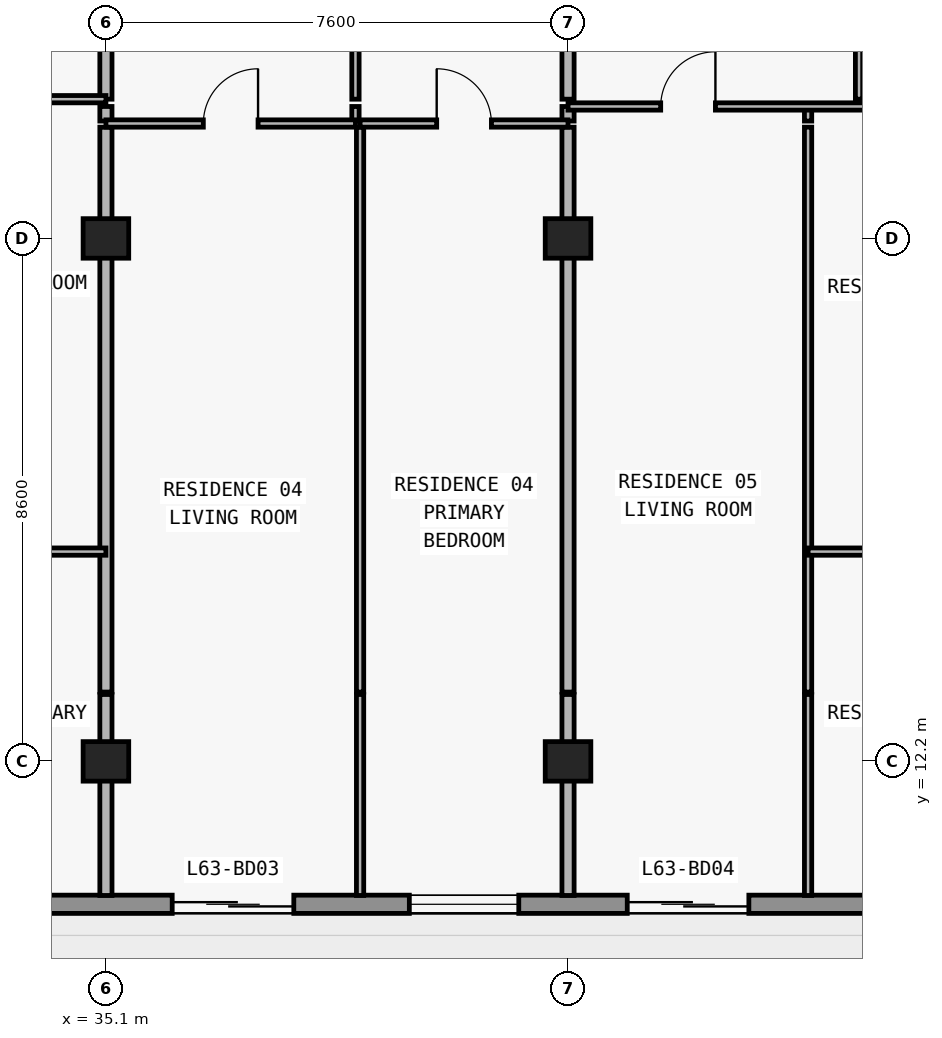
"""IFC4 building model, lengths in metres.
Left out: names, types, materials, properties, quantities, classifications, styles, units other than length and angle.
Written with IfcOpenShell. Run it as: python <this file> out.ifc"""

import sys

from ifc_helpers import new_model, si_unit, direction, frame, frame_2d, origin, origin_2d, place, context, subcontext, project, spatial, rectangle, extrude, element, fill, save


model = new_model("IFC4")
c1 = context("Model", 3, precision=1e-05, world=origin(), true_north=direction((0.0, 1.0)))
c2 = subcontext(c1, "Body", "Model", "MODEL_VIEW")
j1 = project(units=[si_unit("LENGTHUNIT", "METRE"), si_unit("PLANEANGLEUNIT", "RADIAN")], contexts=[c1])
p1 = place(None, origin())
s1 = spatial("IfcSite", under=j1, at=p1, CompositionType="ELEMENT")
p2 = place(p1, origin())
s2 = spatial("IfcBuilding", under=s1, at=p2, CompositionType="ELEMENT")
p3 = place(p2, frame((0.0, 0.0, 226.5)))
s3 = spatial("IfcBuildingStorey", under=s2, at=p3, CompositionType="ELEMENT", Elevation=226.5)
for number, where, z_axis, x_axis in (
    (1, (35.1, 12.2, 0.0), (0.0, 0.0, 1.0), (1.0, 0.0, 0.0)),
    (2, (42.7, 12.2, 0.0), (0.0, 0.0, 1.0), (1.0, 0.0, 0.0)),
    (3, (35.1, 20.8, 0.0), (0.0, 0.0, 1.0), (1.0, 0.0, 0.0)),
    (4, (42.7, 20.8, 0.0), (0.0, 0.0, 1.0), (1.0, 0.0, 0.0)),
):
    element("IfcColumn", number, at=place(p3, frame(where, z_axis=z_axis, x_axis=x_axis)), inside=s3, PredefinedType="COLUMN", context=c2, shape_type="SweptSolid", body=[
        extrude(rectangle(XDim=0.75, YDim=0.65, at=origin_2d()), origin(), (0.0, 0.0, 1.0), 3.05),
    ])
p4 = place(p3, frame((65.7, 9.85, 0.0), z_axis=(0.0, 0.0, 1.0), x_axis=(-1.0, 0.0, 0.0)))
e5 = element("IfcWall", 5, at=p4, inside=s3, PredefinedType="STANDARD", context=c2, shape_type="SweptSolid", body=[
    extrude(rectangle(XDim=53.6, YDim=0.3, at=frame_2d((26.8, 0.0))), origin(), (0.0, 0.0, 1.0), 3.05),
])
p5 = place(p4, frame((48.05, 0.0, 0.85)))
e6 = element("IfcOpeningElement", 6, at=p5, cuts=e5, PredefinedType="OPENING", context=c2, shape_type="SweptSolid", body=[
    extrude(rectangle(XDim=1.8, YDim=1.55, at=frame_2d((0.9, 0.775))), frame((0.0, 0.16, 0.0), z_axis=(0.0, -1.0, 0.0), x_axis=(1.0, 0.0, 0.0)), (0.0, 0.0, 1.0), 0.32),
])
p6 = place(p4, frame((44.09, 0.0, 0.0)))
e7 = element("IfcOpeningElement", 7, at=p6, cuts=e5, PredefinedType="OPENING", context=c2, shape_type="SweptSolid", body=[
    extrude(rectangle(XDim=2.0, YDim=2.3, at=frame_2d((1.0, 1.15))), frame((0.0, 0.16, 0.0), z_axis=(0.0, -1.0, 0.0), x_axis=(1.0, 0.0, 0.0)), (0.0, 0.0, 1.0), 0.32),
])
p7 = place(p4, frame((39.99, 0.0, 0.85)))
e8 = element("IfcOpeningElement", 8, at=p7, cuts=e5, PredefinedType="OPENING", context=c2, shape_type="SweptSolid", body=[
    extrude(rectangle(XDim=1.8, YDim=1.55, at=frame_2d((0.9, 0.775))), frame((0.0, 0.16, 0.0), z_axis=(0.0, -1.0, 0.0), x_axis=(1.0, 0.0, 0.0)), (0.0, 0.0, 1.0), 0.32),
])
p8 = place(p4, frame((36.026, 0.0, 0.0)))
e9 = element("IfcOpeningElement", 9, at=p8, cuts=e5, PredefinedType="OPENING", context=c2, shape_type="SweptSolid", body=[
    extrude(rectangle(XDim=2.0, YDim=2.3, at=frame_2d((1.0, 1.15))), frame((0.0, 0.16, 0.0), z_axis=(0.0, -1.0, 0.0), x_axis=(1.0, 0.0, 0.0)), (0.0, 0.0, 1.0), 0.32),
])
p9 = place(p4, frame((31.726, 0.0, 0.85)))
e10 = element("IfcOpeningElement", 10, at=p9, cuts=e5, PredefinedType="OPENING", context=c2, shape_type="SweptSolid", body=[
    extrude(rectangle(XDim=2.2, YDim=1.55, at=frame_2d((1.1, 0.775))), frame((0.0, 0.16, 0.0), z_axis=(0.0, -1.0, 0.0), x_axis=(1.0, 0.0, 0.0)), (0.0, 0.0, 1.0), 0.32),
])
p10 = place(p4, frame((27.51, 0.0, 0.0)))
e11 = element("IfcOpeningElement", 11, at=p10, cuts=e5, PredefinedType="OPENING", context=c2, shape_type="SweptSolid", body=[
    extrude(rectangle(XDim=2.0, YDim=2.3, at=frame_2d((1.0, 1.15))), frame((0.0, 0.16, 0.0), z_axis=(0.0, -1.0, 0.0), x_axis=(1.0, 0.0, 0.0)), (0.0, 0.0, 1.0), 0.32),
])
p11 = place(p4, frame((23.81, 0.0, 0.85)))
e12 = element("IfcOpeningElement", 12, at=p11, cuts=e5, PredefinedType="OPENING", context=c2, shape_type="SweptSolid", body=[
    extrude(rectangle(XDim=1.8, YDim=1.55, at=frame_2d((0.9, 0.775))), frame((0.0, 0.16, 0.0), z_axis=(0.0, -1.0, 0.0), x_axis=(1.0, 0.0, 0.0)), (0.0, 0.0, 1.0), 0.32),
])
p12 = place(p4, frame((20.026, 0.0, 0.0)))
e13 = element("IfcOpeningElement", 13, at=p12, cuts=e5, PredefinedType="OPENING", context=c2, shape_type="SweptSolid", body=[
    extrude(rectangle(XDim=2.0, YDim=2.3, at=frame_2d((1.0, 1.15))), frame((0.0, 0.16, 0.0), z_axis=(0.0, -1.0, 0.0), x_axis=(1.0, 0.0, 0.0)), (0.0, 0.0, 1.0), 0.32),
])
p13 = place(p4, frame((15.726, 0.0, 0.85)))
e14 = element("IfcOpeningElement", 14, at=p13, cuts=e5, PredefinedType="OPENING", context=c2, shape_type="SweptSolid", body=[
    extrude(rectangle(XDim=2.2, YDim=1.55, at=frame_2d((1.1, 0.775))), frame((0.0, 0.16, 0.0), z_axis=(0.0, -1.0, 0.0), x_axis=(1.0, 0.0, 0.0)), (0.0, 0.0, 1.0), 0.32),
])
p14 = place(p4, frame((11.29, 0.0, 0.0)))
e15 = element("IfcOpeningElement", 15, at=p14, cuts=e5, PredefinedType="OPENING", context=c2, shape_type="SweptSolid", body=[
    extrude(rectangle(XDim=2.0, YDim=2.3, at=frame_2d((1.0, 1.15))), frame((0.0, 0.16, 0.0), z_axis=(0.0, -1.0, 0.0), x_axis=(1.0, 0.0, 0.0)), (0.0, 0.0, 1.0), 0.32),
])
p15 = place(p4, frame((7.19, 0.0, 0.85)))
e16 = element("IfcOpeningElement", 16, at=p15, cuts=e5, PredefinedType="OPENING", context=c2, shape_type="SweptSolid", body=[
    extrude(rectangle(XDim=1.8, YDim=1.55, at=frame_2d((0.9, 0.775))), frame((0.0, 0.16, 0.0), z_axis=(0.0, -1.0, 0.0), x_axis=(1.0, 0.0, 0.0)), (0.0, 0.0, 1.0), 0.32),
])
p16 = place(p4, frame((0.65, 0.0, 0.85)))
e17 = element("IfcOpeningElement", 17, at=p16, cuts=e5, PredefinedType="OPENING", context=c2, shape_type="SweptSolid", body=[
    extrude(rectangle(XDim=1.8, YDim=1.55, at=frame_2d((0.9, 0.775))), frame((0.0, 0.16, 0.0), z_axis=(0.0, -1.0, 0.0), x_axis=(1.0, 0.0, 0.0)), (0.0, 0.0, 1.0), 0.32),
])
p17 = place(p3, frame((35.1, 9.995, 0.0), z_axis=(0.0, 0.0, 1.0), x_axis=(0.0, 1.0, 0.0)))
e18 = element("IfcWall", 18, at=p17, inside=s3, PredefinedType="PARTITIONING", context=c2, shape_type="SweptSolid", body=[
    extrude(rectangle(XDim=3.305, YDim=0.2, at=frame_2d((1.652, 0.0))), origin(), (0.0, 0.0, 1.0), 2.263),
])
p18 = place(p3, frame((35.1, 13.34, 0.0), z_axis=(0.0, 0.0, 1.0), x_axis=(0.0, 1.0, 0.0)))
e19 = element("IfcWall", 19, at=p18, inside=s3, PredefinedType="PARTITIONING", context=c2, shape_type="SweptSolid", body=[
    extrude(rectangle(XDim=9.29, YDim=0.2, at=frame_2d((4.645, 0.0))), origin(), (0.0, 0.0, 1.0), 2.263),
])
p19 = place(p3, frame((35.1, 22.73, 0.0), z_axis=(0.0, 0.0, 1.0), x_axis=(0.0, 1.0, 0.0)))
e20 = element("IfcWall", 20, at=p19, inside=s3, PredefinedType="PARTITIONING", context=c2, shape_type="SweptSolid", body=[
    extrude(rectangle(XDim=0.24, YDim=0.2, at=frame_2d((0.12, 0.0))), origin(), (0.0, 0.0, 1.0), 2.263),
])
p20 = place(p3, frame((35.1, 23.09, 0.0), z_axis=(0.0, 0.0, 1.0), x_axis=(0.0, 1.0, 0.0)))
e21 = element("IfcWall", 21, at=p20, inside=s3, PredefinedType="PARTITIONING", context=c2, shape_type="SweptSolid", body=[
    extrude(rectangle(XDim=4.69, YDim=0.2, at=frame_2d((2.345, 0.0))), origin(), (0.0, 0.0, 1.0), 2.263),
])
p21 = place(p3, frame((39.204, 22.73, 0.0), z_axis=(0.0, 0.0, 1.0), x_axis=(0.0, 1.0, 0.0)))
e22 = element("IfcWall", 22, at=p21, inside=s3, PredefinedType="PARTITIONING", context=c2, shape_type="SweptSolid", body=[
    extrude(rectangle(XDim=0.24, YDim=0.12, at=frame_2d((0.12, 0.0))), origin(), (0.0, 0.0, 1.0), 3.05),
])
p22 = place(p3, frame((39.204, 23.09, 0.0), z_axis=(0.0, 0.0, 1.0), x_axis=(0.0, 1.0, 0.0)))
e23 = element("IfcWall", 23, at=p22, inside=s3, PredefinedType="PARTITIONING", context=c2, shape_type="SweptSolid", body=[
    extrude(rectangle(XDim=4.69, YDim=0.12, at=frame_2d((2.345, 0.0))), origin(), (0.0, 0.0, 1.0), 3.05),
])
p23 = place(p22, frame((1.895, 0.0, 0.0)))
e24 = element("IfcOpeningElement", 24, at=p23, cuts=e23, PredefinedType="OPENING", context=c2, shape_type="SweptSolid", body=[
    extrude(rectangle(XDim=0.9, YDim=2.15, at=frame_2d((0.45, 1.075))), frame((0.0, 0.07, 0.0), z_axis=(0.0, -1.0, 0.0), x_axis=(1.0, 0.0, 0.0)), (0.0, 0.0, 1.0), 0.14),
])
p24 = place(p3, frame((39.28, 9.995, 0.0), z_axis=(0.0, 0.0, 1.0), x_axis=(0.0, 1.0, 0.0)))
e25 = element("IfcWall", 25, at=p24, inside=s3, PredefinedType="PARTITIONING", context=c2, shape_type="SweptSolid", body=[
    extrude(rectangle(XDim=3.305, YDim=0.12, at=frame_2d((1.652, 0.0))), origin(), (0.0, 0.0, 1.0), 3.05),
])
p25 = place(p3, frame((39.28, 13.34, 0.0), z_axis=(0.0, 0.0, 1.0), x_axis=(0.0, 1.0, 0.0)))
e26 = element("IfcWall", 26, at=p25, inside=s3, PredefinedType="PARTITIONING", context=c2, shape_type="SweptSolid", body=[
    extrude(rectangle(XDim=9.29, YDim=0.12, at=frame_2d((4.645, 0.0))), origin(), (0.0, 0.0, 1.0), 3.05),
])
p26 = place(p3, frame((42.7, 9.995, 0.0), z_axis=(0.0, 0.0, 1.0), x_axis=(0.0, 1.0, 0.0)))
e27 = element("IfcWall", 27, at=p26, inside=s3, PredefinedType="PARTITIONING", context=c2, shape_type="SweptSolid", body=[
    extrude(rectangle(XDim=3.305, YDim=0.2, at=frame_2d((1.652, 0.0))), origin(), (0.0, 0.0, 1.0), 2.263),
])
p27 = place(p3, frame((42.7, 13.34, 0.0), z_axis=(0.0, 0.0, 1.0), x_axis=(0.0, 1.0, 0.0)))
e28 = element("IfcWall", 28, at=p27, inside=s3, PredefinedType="PARTITIONING", context=c2, shape_type="SweptSolid", body=[
    extrude(rectangle(XDim=9.29, YDim=0.2, at=frame_2d((4.645, 0.0))), origin(), (0.0, 0.0, 1.0), 2.263),
])
p28 = place(p3, frame((42.7, 22.73, 0.0), z_axis=(0.0, 0.0, 1.0), x_axis=(0.0, 1.0, 0.0)))
e29 = element("IfcWall", 29, at=p28, inside=s3, PredefinedType="PARTITIONING", context=c2, shape_type="SweptSolid", body=[
    extrude(rectangle(XDim=0.24, YDim=0.2, at=frame_2d((0.12, 0.0))), origin(), (0.0, 0.0, 1.0), 2.263),
])
p29 = place(p3, frame((42.7, 23.09, 0.0), z_axis=(0.0, 0.0, 1.0), x_axis=(0.0, 1.0, 0.0)))
e30 = element("IfcWall", 30, at=p29, inside=s3, PredefinedType="PARTITIONING", context=c2, shape_type="SweptSolid", body=[
    extrude(rectangle(XDim=4.69, YDim=0.2, at=frame_2d((2.345, 0.0))), origin(), (0.0, 0.0, 1.0), 2.263),
])
p30 = place(p3, frame((46.648, 9.995, 0.0), z_axis=(0.0, 0.0, 1.0), x_axis=(0.0, 1.0, 0.0)))
e31 = element("IfcWall", 31, at=p30, inside=s3, PredefinedType="PARTITIONING", context=c2, shape_type="SweptSolid", body=[
    extrude(rectangle(XDim=3.305, YDim=0.12, at=frame_2d((1.652, 0.0))), origin(), (0.0, 0.0, 1.0), 3.05),
])
p31 = place(p3, frame((46.648, 13.34, 0.0), z_axis=(0.0, 0.0, 1.0), x_axis=(0.0, 1.0, 0.0)))
e32 = element("IfcWall", 32, at=p31, inside=s3, PredefinedType="PARTITIONING", context=c2, shape_type="SweptSolid", body=[
    extrude(rectangle(XDim=9.29, YDim=0.12, at=frame_2d((4.645, 0.0))), origin(), (0.0, 0.0, 1.0), 3.05),
])
p32 = place(p3, frame((46.648, 22.73, 0.0), z_axis=(0.0, 0.0, 1.0), x_axis=(0.0, 1.0, 0.0)))
e33 = element("IfcWall", 33, at=p32, inside=s3, PredefinedType="PARTITIONING", context=c2, shape_type="SweptSolid", body=[
    extrude(rectangle(XDim=0.24, YDim=0.12, at=frame_2d((0.12, 0.0))), origin(), (0.0, 0.0, 1.0), 3.05),
])
p33 = place(p3, frame((47.486, 23.09, 0.0), z_axis=(0.0, 0.0, 1.0), x_axis=(0.0, 1.0, 0.0)))
e34 = element("IfcWall", 34, at=p33, inside=s3, PredefinedType="PARTITIONING", context=c2, shape_type="SweptSolid", body=[
    extrude(rectangle(XDim=4.69, YDim=0.12, at=frame_2d((2.345, 0.0))), origin(), (0.0, 0.0, 1.0), 3.05),
])
p34 = place(p33, frame((1.895, 0.0, 0.0)))
e35 = element("IfcOpeningElement", 35, at=p34, cuts=e34, PredefinedType="OPENING", context=c2, shape_type="SweptSolid", body=[
    extrude(rectangle(XDim=0.9, YDim=2.15, at=frame_2d((0.45, 1.075))), frame((0.0, 0.07, 0.0), z_axis=(0.0, -1.0, 0.0), x_axis=(1.0, 0.0, 0.0)), (0.0, 0.0, 1.0), 0.14),
])
p35 = place(p3, frame((30.648, 15.65, 0.0), z_axis=(0.0, 0.0, 1.0), x_axis=(1.0, 0.0, 0.0)))
e36 = element("IfcWall", 36, at=p35, inside=s3, PredefinedType="PARTITIONING", context=c2, shape_type="SweptSolid", body=[
    extrude(rectangle(XDim=4.452, YDim=0.12, at=frame_2d((2.226, 0.0))), origin(), (0.0, 0.0, 1.0), 3.05),
])
p36 = place(p35, frame((1.776, 0.0, 0.0)))
e37 = element("IfcOpeningElement", 37, at=p36, cuts=e36, PredefinedType="OPENING", context=c2, shape_type="SweptSolid", body=[
    extrude(rectangle(XDim=0.9, YDim=2.15, at=frame_2d((0.45, 1.075))), frame((0.0, 0.07, 0.0), z_axis=(0.0, -1.0, 0.0), x_axis=(1.0, 0.0, 0.0)), (0.0, 0.0, 1.0), 0.14),
])
p37 = place(p3, frame((46.648, 15.65, 0.0), z_axis=(0.0, 0.0, 1.0), x_axis=(1.0, 0.0, 0.0)))
e38 = element("IfcWall", 38, at=p37, inside=s3, PredefinedType="PARTITIONING", context=c2, shape_type="SweptSolid", body=[
    extrude(rectangle(XDim=4.452, YDim=0.12, at=frame_2d((2.226, 0.0))), origin(), (0.0, 0.0, 1.0), 3.05),
])
p38 = place(p37, frame((1.776, 0.0, 0.0)))
e39 = element("IfcOpeningElement", 39, at=p38, cuts=e38, PredefinedType="OPENING", context=c2, shape_type="SweptSolid", body=[
    extrude(rectangle(XDim=0.9, YDim=2.15, at=frame_2d((0.45, 1.075))), frame((0.0, 0.07, 0.0), z_axis=(0.0, -1.0, 0.0), x_axis=(1.0, 0.0, 0.0)), (0.0, 0.0, 1.0), 0.14),
])
p39 = place(p3, frame((35.1, 22.69, 0.0), z_axis=(0.0, 0.0, 1.0), x_axis=(1.0, 0.0, 0.0)))
e40 = element("IfcWall", 40, at=p39, inside=s3, PredefinedType="PARTITIONING", context=c2, shape_type="SweptSolid", body=[
    extrude(rectangle(XDim=4.104, YDim=0.12, at=frame_2d((2.052, 0.0))), origin(), (0.0, 0.0, 1.0), 3.05),
])
p40 = place(p39, frame((1.602, 0.0, 0.0)))
e41 = element("IfcOpeningElement", 41, at=p40, cuts=e40, PredefinedType="OPENING", context=c2, shape_type="SweptSolid", body=[
    extrude(rectangle(XDim=0.9, YDim=2.15, at=frame_2d((0.45, 1.075))), frame((0.0, 0.07, 0.0), z_axis=(0.0, -1.0, 0.0), x_axis=(1.0, 0.0, 0.0)), (0.0, 0.0, 1.0), 0.14),
])
p41 = place(p3, frame((39.28, 22.69, 0.0), z_axis=(0.0, 0.0, 1.0), x_axis=(1.0, 0.0, 0.0)))
e42 = element("IfcWall", 42, at=p41, inside=s3, PredefinedType="PARTITIONING", context=c2, shape_type="SweptSolid", body=[
    extrude(rectangle(XDim=3.42, YDim=0.12, at=frame_2d((1.71, 0.0))), origin(), (0.0, 0.0, 1.0), 3.05),
])
p42 = place(p41, frame((1.26, 0.0, 0.0)))
e43 = element("IfcOpeningElement", 43, at=p42, cuts=e42, PredefinedType="OPENING", context=c2, shape_type="SweptSolid", body=[
    extrude(rectangle(XDim=0.9, YDim=2.15, at=frame_2d((0.45, 1.075))), frame((0.0, 0.07, 0.0), z_axis=(0.0, -1.0, 0.0), x_axis=(1.0, 0.0, 0.0)), (0.0, 0.0, 1.0), 0.14),
])
p43 = place(p3, frame((42.7, 22.97, 0.0), z_axis=(0.0, 0.0, 1.0), x_axis=(1.0, 0.0, 0.0)))
e44 = element("IfcWall", 44, at=p43, inside=s3, PredefinedType="PARTITIONING", context=c2, shape_type="SweptSolid", body=[
    extrude(rectangle(XDim=8.18, YDim=0.12, at=frame_2d((4.09, 0.0))), origin(), (0.0, 0.0, 1.0), 3.05),
])
p44 = place(p43, frame((1.524, 0.0, 0.0)))
e45 = element("IfcOpeningElement", 45, at=p44, cuts=e44, PredefinedType="OPENING", context=c2, shape_type="SweptSolid", body=[
    extrude(rectangle(XDim=0.9, YDim=2.15, at=frame_2d((0.45, 1.075))), frame((0.0, 0.07, 0.0), z_axis=(0.0, -1.0, 0.0), x_axis=(1.0, 0.0, 0.0)), (0.0, 0.0, 1.0), 0.14),
])
p45 = place(p43, frame((6.033, 0.0, 0.0)))
e46 = element("IfcOpeningElement", 46, at=p45, cuts=e44, PredefinedType="OPENING", context=c2, shape_type="SweptSolid", body=[
    extrude(rectangle(XDim=0.9, YDim=2.15, at=frame_2d((0.45, 1.075))), frame((0.0, 0.07, 0.0), z_axis=(0.0, -1.0, 0.0), x_axis=(1.0, 0.0, 0.0)), (0.0, 0.0, 1.0), 0.14),
])
p46 = place(p3, frame((26.92, 23.09, 0.0), z_axis=(0.0, 0.0, 1.0), x_axis=(1.0, 0.0, 0.0)))
e47 = element("IfcWall", 47, at=p46, inside=s3, PredefinedType="PARTITIONING", context=c2, shape_type="SweptSolid", body=[
    extrude(rectangle(XDim=8.18, YDim=0.12, at=frame_2d((4.09, 0.0))), origin(), (0.0, 0.0, 1.0), 3.05),
])
p47 = place(p46, frame((1.414, 0.0, 0.0)))
e48 = element("IfcOpeningElement", 48, at=p47, cuts=e47, PredefinedType="OPENING", context=c2, shape_type="SweptSolid", body=[
    extrude(rectangle(XDim=0.9, YDim=2.15, at=frame_2d((0.45, 1.075))), frame((0.0, 0.07, 0.0), z_axis=(0.0, -1.0, 0.0), x_axis=(1.0, 0.0, 0.0)), (0.0, 0.0, 1.0), 0.14),
])
p48 = place(p46, frame((5.673, 0.0, 0.0)))
e49 = element("IfcOpeningElement", 49, at=p48, cuts=e47, PredefinedType="OPENING", context=c2, shape_type="SweptSolid", body=[
    extrude(rectangle(XDim=0.9, YDim=2.15, at=frame_2d((0.45, 1.075))), frame((0.0, 0.07, 0.0), z_axis=(0.0, -1.0, 0.0), x_axis=(1.0, 0.0, 0.0)), (0.0, 0.0, 1.0), 0.14),
])
p49 = place(p10, origin())
e50 = element("IfcDoor", 50, at=p49, inside=s3, OperationType="DOUBLE_DOOR_SLIDING", PredefinedType="DOOR", context=c2, shape_type="SweptSolid", body=[
    extrude(rectangle(XDim=2.0, YDim=2.3, at=frame_2d((1.0, 1.15))), frame((0.0, 0.025, 0.0), z_axis=(0.0, -1.0, 0.0), x_axis=(1.0, 0.0, 0.0)), (0.0, 0.0, 1.0), 0.05),
])
fill(e11, e50)
p50 = place(p11, origin())
e51 = element("IfcWindow", 51, at=p50, inside=s3, PartitioningType="SINGLE_PANEL", PredefinedType="WINDOW", context=c2, shape_type="SweptSolid", body=[
    extrude(rectangle(XDim=1.8, YDim=1.55, at=frame_2d((0.9, 0.775))), frame((0.0, 0.03, 0.0), z_axis=(0.0, -1.0, 0.0), x_axis=(1.0, 0.0, 0.0)), (0.0, 0.0, 1.0), 0.06),
])
fill(e12, e51)
p51 = place(p12, origin())
e52 = element("IfcDoor", 52, at=p51, inside=s3, OperationType="DOUBLE_DOOR_SLIDING", PredefinedType="DOOR", context=c2, shape_type="SweptSolid", body=[
    extrude(rectangle(XDim=2.0, YDim=2.3, at=frame_2d((1.0, 1.15))), frame((0.0, 0.025, 0.0), z_axis=(0.0, -1.0, 0.0), x_axis=(1.0, 0.0, 0.0)), (0.0, 0.0, 1.0), 0.05),
])
fill(e13, e52)
p52 = place(p40, origin())
e53 = element("IfcDoor", 53, at=p52, inside=s3, OperationType="SINGLE_SWING_RIGHT", PredefinedType="DOOR", context=c2, shape_type="SweptSolid", body=[
    extrude(rectangle(XDim=0.9, YDim=2.15, at=frame_2d((0.45, 1.075))), frame((0.0, 0.025, 0.0), z_axis=(0.0, -1.0, 0.0), x_axis=(1.0, 0.0, 0.0)), (0.0, 0.0, 1.0), 0.05),
])
fill(e41, e53)
p53 = place(p42, origin())
e54 = element("IfcDoor", 54, at=p53, inside=s3, OperationType="SINGLE_SWING_LEFT", PredefinedType="DOOR", context=c2, shape_type="SweptSolid", body=[
    extrude(rectangle(XDim=0.9, YDim=2.15, at=frame_2d((0.45, 1.075))), frame((0.0, 0.025, 0.0), z_axis=(0.0, -1.0, 0.0), x_axis=(1.0, 0.0, 0.0)), (0.0, 0.0, 1.0), 0.05),
])
fill(e43, e54)
p54 = place(p44, origin())
e55 = element("IfcDoor", 55, at=p54, inside=s3, OperationType="SINGLE_SWING_RIGHT", PredefinedType="DOOR", context=c2, shape_type="SweptSolid", body=[
    extrude(rectangle(XDim=0.9, YDim=2.15, at=frame_2d((0.45, 1.075))), frame((0.0, 0.025, 0.0), z_axis=(0.0, -1.0, 0.0), x_axis=(1.0, 0.0, 0.0)), (0.0, 0.0, 1.0), 0.05),
])
fill(e45, e55)
save(model, sys.argv[1])
